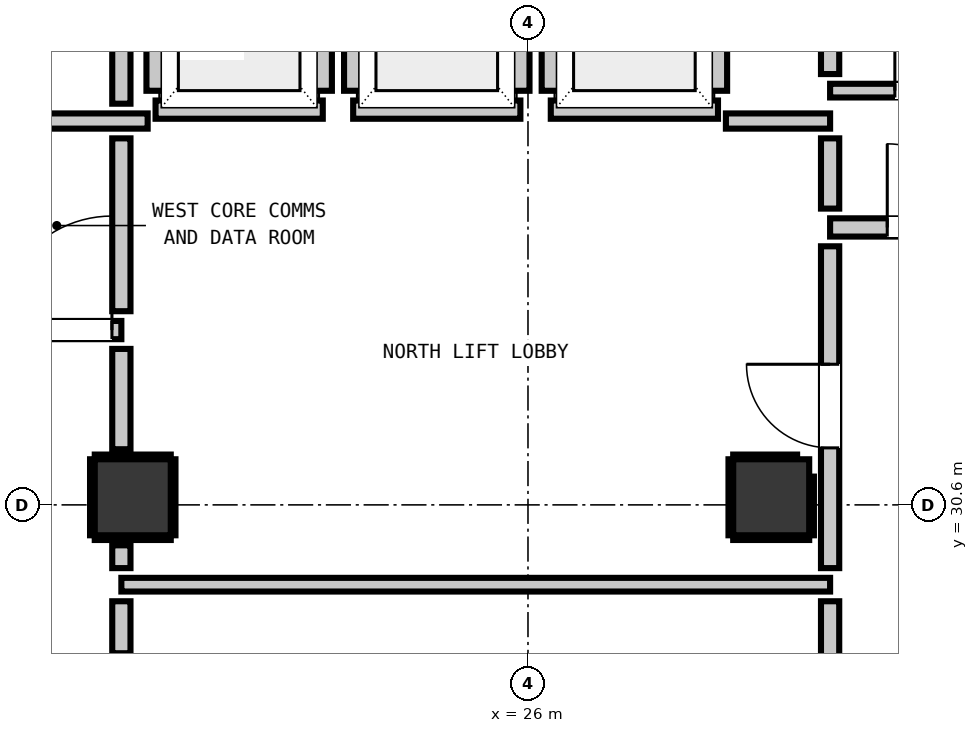
"""IFC4 building model, lengths in metres.
Left out: names, types, materials, properties, quantities, classifications, styles, units other than length and angle.
Written with IfcOpenShell. Run it as: python <this file> out.ifc"""

import sys

from ifc_helpers import new_model, si_unit, direction, frame, frame_2d, origin, origin_2d, place, context, subcontext, project, spatial, rectangle, extrude, element, fill, save


model = new_model("IFC4")
c1 = context("Model", 3, precision=1e-05, world=origin(), true_north=direction((0.0, 1.0)))
c2 = subcontext(c1, "Body", "Model", "MODEL_VIEW")
j1 = project(units=[si_unit("LENGTHUNIT", "METRE"), si_unit("PLANEANGLEUNIT", "RADIAN")], contexts=[c1])
p1 = place(None, origin())
s1 = spatial("IfcSite", under=j1, at=p1, CompositionType="ELEMENT")
p2 = place(p1, origin())
s2 = spatial("IfcBuilding", under=s1, at=p2, CompositionType="ELEMENT")
p3 = place(p2, frame((0.0, 0.0, 61.84)))
s3 = spatial("IfcBuildingStorey", under=s2, at=p3, CompositionType="ELEMENT", Elevation=61.84)
for number, where, z_axis, x_axis in (
    (1, (20.8, 30.7, 0.0), (0.0, 0.0, 1.0), (1.0, 0.0, 0.0)),
    (2, (29.2, 30.7, 0.0), (0.0, 0.0, 1.0), (1.0, 0.0, 0.0)),
):
    element("IfcColumn", number, at=place(p3, frame(where, z_axis=z_axis, x_axis=x_axis)), inside=s3, PredefinedType="COLUMN", context=c2, shape_type="SweptSolid", body=[
        extrude(rectangle(XDim=1.0, YDim=1.0, at=origin_2d()), origin(), (0.0, 0.0, 1.0), 3.32),
    ])
p4 = place(p3, frame((21.1, 35.8, 0.0), z_axis=(0.0, 0.0, 1.0), x_axis=(1.0, 0.0, 0.0)))
e3 = element("IfcWall", 3, at=p4, inside=s3, PredefinedType="PARTITIONING", context=c2, shape_type="SweptSolid", body=[
    extrude(rectangle(XDim=2.2, YDim=0.24, at=frame_2d((1.1, 0.0))), origin(), (0.0, 0.0, 1.0), 3.06),
])
p5 = place(p3, frame((21.1, 36.048, 0.0), z_axis=(0.0, 0.0, 1.0), x_axis=(0.0, 1.0, 0.0)))
e4 = element("IfcWall", 4, at=p5, inside=s3, PredefinedType="PARTITIONING", context=c2, shape_type="SweptSolid", body=[
    extrude(rectangle(XDim=2.104, YDim=0.24, at=frame_2d((1.052, 0.0))), origin(), (0.0, 0.0, 1.0), 2.295),
])
p6 = place(p3, frame((23.3, 36.048, 0.0), z_axis=(0.0, 0.0, 1.0), x_axis=(0.0, 1.0, 0.0)))
e5 = element("IfcWall", 5, at=p6, inside=s3, PredefinedType="PARTITIONING", context=c2, shape_type="SweptSolid", body=[
    extrude(rectangle(XDim=2.104, YDim=0.24, at=frame_2d((1.052, 0.0))), origin(), (0.0, 0.0, 1.0), 3.06),
])
p7 = place(p3, frame((23.7, 35.8, 0.0), z_axis=(0.0, 0.0, 1.0), x_axis=(1.0, 0.0, 0.0)))
e6 = element("IfcWall", 6, at=p7, inside=s3, PredefinedType="PARTITIONING", context=c2, shape_type="SweptSolid", body=[
    extrude(rectangle(XDim=2.2, YDim=0.24, at=frame_2d((1.1, 0.0))), origin(), (0.0, 0.0, 1.0), 3.06),
])
for number, where, z_axis, x_axis in (
    (7, (23.7, 36.048, 0.0), (0.0, 0.0, 1.0), (0.0, 1.0, 0.0)),
    (8, (25.9, 36.048, 0.0), (0.0, 0.0, 1.0), (0.0, 1.0, 0.0)),
):
    element("IfcWall", number, at=place(p3, frame(where, z_axis=z_axis, x_axis=x_axis)), inside=s3, PredefinedType="PARTITIONING", context=c2, shape_type="SweptSolid", body=[
        extrude(rectangle(XDim=2.104, YDim=0.24, at=frame_2d((1.052, 0.0))), origin(), (0.0, 0.0, 1.0), 3.06),
    ])
p8 = place(p3, frame((26.3, 35.8, 0.0), z_axis=(0.0, 0.0, 1.0), x_axis=(1.0, 0.0, 0.0)))
e9 = element("IfcWall", 9, at=p8, inside=s3, PredefinedType="PARTITIONING", context=c2, shape_type="SweptSolid", body=[
    extrude(rectangle(XDim=2.2, YDim=0.24, at=frame_2d((1.1, 0.0))), origin(), (0.0, 0.0, 1.0), 3.06),
])
for number, where, z_axis, x_axis in (
    (10, (26.3, 36.048, 0.0), (0.0, 0.0, 1.0), (0.0, 1.0, 0.0)),
    (11, (28.5, 36.048, 0.0), (0.0, 0.0, 1.0), (0.0, 1.0, 0.0)),
):
    element("IfcWall", number, at=place(p3, frame(where, z_axis=z_axis, x_axis=x_axis)), inside=s3, PredefinedType="PARTITIONING", context=c2, shape_type="SweptSolid", body=[
        extrude(rectangle(XDim=2.104, YDim=0.24, at=frame_2d((1.052, 0.0))), origin(), (0.0, 0.0, 1.0), 3.06),
    ])
p9 = place(p3, frame((17.45, 32.9, 0.0), z_axis=(0.0, 0.0, 1.0), x_axis=(1.0, 0.0, 0.0)))
e12 = element("IfcWall", 12, at=p9, inside=s3, PredefinedType="PARTITIONING", context=c2, shape_type="SweptSolid", body=[
    extrude(rectangle(XDim=3.2, YDim=0.24, at=frame_2d((1.6, 0.0))), origin(), (0.0, 0.0, 1.0), 3.06),
])
p10 = place(p9, frame((0.159, 0.0, 0.0)))
e13 = element("IfcOpeningElement", 13, at=p10, cuts=e12, PredefinedType="OPENING", context=c2, shape_type="SweptSolid", body=[
    extrude(rectangle(XDim=1.1, YDim=2.15, at=frame_2d((0.55, 1.075))), frame((0.0, 0.13, 0.0), z_axis=(0.0, -1.0, 0.0), x_axis=(1.0, 0.0, 0.0)), (0.0, 0.0, 1.0), 0.26),
])
p11 = place(p9, frame((1.576, 0.0, 0.0)))
e14 = element("IfcOpeningElement", 14, at=p11, cuts=e12, PredefinedType="OPENING", context=c2, shape_type="SweptSolid", body=[
    extrude(rectangle(XDim=1.5, YDim=2.15, at=frame_2d((0.75, 1.075))), frame((0.0, 0.13, 0.0), z_axis=(0.0, -1.0, 0.0), x_axis=(1.0, 0.0, 0.0)), (0.0, 0.0, 1.0), 0.26),
])
p12 = place(p3, frame((29.975, 34.25, 0.0), z_axis=(0.0, 0.0, 1.0), x_axis=(1.0, 0.0, 0.0)))
e15 = element("IfcWall", 15, at=p12, inside=s3, PredefinedType="PARTITIONING", context=c2, shape_type="SweptSolid", body=[
    extrude(rectangle(XDim=2.475, YDim=0.24, at=frame_2d((1.237, 0.0))), origin(), (0.0, 0.0, 1.0), 3.06),
])
p13 = place(p12, frame((0.752, 0.0, 0.0)))
e16 = element("IfcOpeningElement", 16, at=p13, cuts=e15, PredefinedType="OPENING", context=c2, shape_type="SweptSolid", body=[
    extrude(rectangle(XDim=1.1, YDim=2.15, at=frame_2d((0.55, 1.075))), frame((0.0, 0.13, 0.0), z_axis=(0.0, -1.0, 0.0), x_axis=(1.0, 0.0, 0.0)), (0.0, 0.0, 1.0), 0.26),
])
p14 = place(p3, frame((18.95, 35.65, 0.0), z_axis=(0.0, 0.0, 1.0), x_axis=(1.0, 0.0, 0.0)))
e17 = element("IfcWall", 17, at=p14, inside=s3, PredefinedType="PARTITIONING", context=c2, shape_type="SweptSolid", body=[
    extrude(rectangle(XDim=2.046, YDim=0.2, at=frame_2d((1.023, 0.0))), origin(), (0.0, 0.0, 1.0), 3.06),
])
p15 = place(p3, frame((28.604, 35.65, 0.0), z_axis=(0.0, 0.0, 1.0), x_axis=(1.0, 0.0, 0.0)))
e18 = element("IfcWall", 18, at=p15, inside=s3, PredefinedType="PARTITIONING", context=c2, shape_type="SweptSolid", body=[
    extrude(rectangle(XDim=1.371, YDim=0.2, at=frame_2d((0.686, 0.0))), origin(), (0.0, 0.0, 1.0), 3.06),
])
p16 = place(p3, frame((20.65, 29.55, 0.0), z_axis=(0.0, 0.0, 1.0), x_axis=(1.0, 0.0, 0.0)))
e19 = element("IfcWall", 19, at=p16, inside=s3, PredefinedType="PARTITIONING", context=c2, shape_type="SweptSolid", body=[
    extrude(rectangle(XDim=9.325, YDim=0.18, at=frame_2d((4.663, 0.0))), origin(), (0.0, 0.0, 1.0), 3.06),
])
p17 = place(p3, frame((29.975, 36.05, 0.0), z_axis=(0.0, 0.0, 1.0), x_axis=(1.0, 0.0, 0.0)))
e20 = element("IfcWall", 20, at=p17, inside=s3, PredefinedType="PARTITIONING", context=c2, shape_type="SweptSolid", body=[
    extrude(rectangle(XDim=2.505, YDim=0.18, at=frame_2d((1.252, 0.0))), origin(), (0.0, 0.0, 1.0), 3.06),
])
p18 = place(p17, frame((0.852, 0.0, 0.0)))
e21 = element("IfcOpeningElement", 21, at=p18, cuts=e20, PredefinedType="OPENING", context=c2, shape_type="SweptSolid", body=[
    extrude(rectangle(XDim=0.9, YDim=2.1, at=frame_2d((0.45, 1.05))), frame((0.0, 0.1, 0.0), z_axis=(0.0, -1.0, 0.0), x_axis=(1.0, 0.0, 0.0)), (0.0, 0.0, 1.0), 0.2),
])
p19 = place(p3, frame((20.65, 28.648, 0.0), z_axis=(0.0, 0.0, 1.0), x_axis=(0.0, 1.0, 0.0)))
e22 = element("IfcWall", 22, at=p19, inside=s3, PredefinedType="PARTITIONING", context=c2, shape_type="SweptSolid", body=[
    extrude(rectangle(XDim=0.684, YDim=0.24, at=frame_2d((0.342, 0.0))), origin(), (0.0, 0.0, 1.0), 2.295),
])
p20 = place(p3, frame((20.65, 29.768, 0.0), z_axis=(0.0, 0.0, 1.0), x_axis=(0.0, 1.0, 0.0)))
e23 = element("IfcWall", 23, at=p20, inside=s3, PredefinedType="PARTITIONING", context=c2, shape_type="SweptSolid", body=[
    extrude(rectangle(XDim=0.3, YDim=0.24, at=frame_2d((0.15, 0.0))), origin(), (0.0, 0.0, 1.0), 2.295),
])
p21 = place(p3, frame((20.65, 31.332, 0.0), z_axis=(0.0, 0.0, 1.0), x_axis=(0.0, 1.0, 0.0)))
e24 = element("IfcWall", 24, at=p21, inside=s3, PredefinedType="PARTITIONING", context=c2, shape_type="SweptSolid", body=[
    extrude(rectangle(XDim=1.32, YDim=0.24, at=frame_2d((0.66, 0.0))), origin(), (0.0, 0.0, 1.0), 2.295),
])
p22 = place(p3, frame((20.65, 33.148, 0.0), z_axis=(0.0, 0.0, 1.0), x_axis=(0.0, 1.0, 0.0)))
e25 = element("IfcWall", 25, at=p22, inside=s3, PredefinedType="PARTITIONING", context=c2, shape_type="SweptSolid", body=[
    extrude(rectangle(XDim=2.274, YDim=0.24, at=frame_2d((1.137, 0.0))), origin(), (0.0, 0.0, 1.0), 2.295),
])
p23 = place(p3, frame((20.65, 35.878, 0.0), z_axis=(0.0, 0.0, 1.0), x_axis=(0.0, 1.0, 0.0)))
e26 = element("IfcWall", 26, at=p23, inside=s3, PredefinedType="PARTITIONING", context=c2, shape_type="SweptSolid", body=[
    extrude(rectangle(XDim=2.674, YDim=0.24, at=frame_2d((1.337, 0.0))), origin(), (0.0, 0.0, 1.0), 2.295),
])
p24 = place(p3, frame((29.975, 25.648, 0.0), z_axis=(0.0, 0.0, 1.0), x_axis=(0.0, 1.0, 0.0)))
e27 = element("IfcWall", 27, at=p24, inside=s3, PredefinedType="PARTITIONING", context=c2, shape_type="SweptSolid", body=[
    extrude(rectangle(XDim=3.684, YDim=0.24, at=frame_2d((1.842, 0.0))), origin(), (0.0, 0.0, 1.0), 3.06),
])
p25 = place(p3, frame((29.975, 29.768, 0.0), z_axis=(0.0, 0.0, 1.0), x_axis=(0.0, 1.0, 0.0)))
e28 = element("IfcWall", 28, at=p25, inside=s3, PredefinedType="PARTITIONING", context=c2, shape_type="SweptSolid", body=[
    extrude(rectangle(XDim=4.234, YDim=0.24, at=frame_2d((2.117, 0.0))), origin(), (0.0, 0.0, 1.0), 3.06),
])
p26 = place(p25, frame((1.582, 0.0, 0.0)))
e29 = element("IfcOpeningElement", 29, at=p26, cuts=e28, PredefinedType="OPENING", context=c2, shape_type="SweptSolid", body=[
    extrude(rectangle(XDim=1.1, YDim=2.15, at=frame_2d((0.55, 1.075))), frame((0.0, 0.13, 0.0), z_axis=(0.0, -1.0, 0.0), x_axis=(1.0, 0.0, 0.0)), (0.0, 0.0, 1.0), 0.26),
])
p27 = place(p3, frame((29.975, 34.498, 0.0), z_axis=(0.0, 0.0, 1.0), x_axis=(0.0, 1.0, 0.0)))
e30 = element("IfcWall", 30, at=p27, inside=s3, PredefinedType="PARTITIONING", context=c2, shape_type="SweptSolid", body=[
    extrude(rectangle(XDim=0.924, YDim=0.24, at=frame_2d((0.462, 0.0))), origin(), (0.0, 0.0, 1.0), 3.06),
])
p28 = place(p3, frame((29.975, 36.268, 0.0), z_axis=(0.0, 0.0, 1.0), x_axis=(0.0, 1.0, 0.0)))
e31 = element("IfcWall", 31, at=p28, inside=s3, PredefinedType="PARTITIONING", context=c2, shape_type="SweptSolid", body=[
    extrude(rectangle(XDim=2.284, YDim=0.24, at=frame_2d((1.142, 0.0))), origin(), (0.0, 0.0, 1.0), 3.06),
])
for number, where, z_axis, x_axis in (
    (32, (20.3, 30.168, 0.0), (0.0, 0.0, 1.0), (1.0, 0.0, 0.0)),
    (33, (20.3, 31.232, 0.0), (0.0, 0.0, 1.0), (1.0, 0.0, 0.0)),
    (34, (20.268, 30.2, 0.0), (0.0, 0.0, 1.0), (0.0, 1.0, 0.0)),
    (35, (21.332, 30.2, 0.0), (0.0, 0.0, 1.0), (0.0, 1.0, 0.0)),
    (36, (28.7, 30.168, 0.0), (0.0, 0.0, 1.0), (1.0, 0.0, 0.0)),
):
    element("IfcWall", number, at=place(p3, frame(where, z_axis=z_axis, x_axis=x_axis)), inside=s3, PredefinedType="PARTITIONING", context=c2, shape_type="SweptSolid", body=[
        extrude(rectangle(XDim=1.0, YDim=0.06, at=frame_2d((0.5, 0.0))), origin(), (0.0, 0.0, 1.0), 1.45),
    ])
p29 = place(p3, frame((28.7, 31.232, 0.0), z_axis=(0.0, 0.0, 1.0), x_axis=(1.0, 0.0, 0.0)))
e37 = element("IfcWall", 37, at=p29, inside=s3, PredefinedType="PARTITIONING", context=c2, shape_type="SweptSolid", body=[
    extrude(rectangle(XDim=0.841, YDim=0.06, at=frame_2d((0.42, 0.0))), origin(), (0.0, 0.0, 1.0), 1.45),
])
p30 = place(p3, frame((28.668, 30.2, 0.0), z_axis=(0.0, 0.0, 1.0), x_axis=(0.0, 1.0, 0.0)))
e38 = element("IfcWall", 38, at=p30, inside=s3, PredefinedType="PARTITIONING", context=c2, shape_type="SweptSolid", body=[
    extrude(rectangle(XDim=1.0, YDim=0.06, at=frame_2d((0.5, 0.0))), origin(), (0.0, 0.0, 1.0), 1.45),
])
p31 = place(p3, frame((29.732, 30.2, 0.0), z_axis=(0.0, 0.0, 1.0), x_axis=(0.0, 1.0, 0.0)))
e39 = element("IfcWall", 39, at=p31, inside=s3, PredefinedType="PARTITIONING", context=c2, shape_type="SweptSolid", body=[
    extrude(rectangle(XDim=0.772, YDim=0.06, at=frame_2d((0.386, 0.0))), origin(), (0.0, 0.0, 1.0), 1.45),
])
p32 = place(p26, origin())
e40 = element("IfcDoor", 40, at=p32, inside=s3, OperationType="SINGLE_SWING_RIGHT", PredefinedType="DOOR", context=c2, shape_type="SweptSolid", body=[
    extrude(rectangle(XDim=1.1, YDim=2.15, at=frame_2d((0.55, 1.075))), frame((0.0, 0.025, 0.0), z_axis=(0.0, -1.0, 0.0), x_axis=(1.0, 0.0, 0.0)), (0.0, 0.0, 1.0), 0.05),
])
fill(e29, e40)
p33 = place(p13, origin())
e41 = element("IfcDoor", 41, at=p33, inside=s3, OperationType="SINGLE_SWING_LEFT", PredefinedType="DOOR", context=c2, shape_type="SweptSolid", body=[
    extrude(rectangle(XDim=1.1, YDim=2.15, at=frame_2d((0.55, 1.075))), frame((0.0, 0.025, 0.0), z_axis=(0.0, -1.0, 0.0), x_axis=(1.0, 0.0, 0.0)), (0.0, 0.0, 1.0), 0.05),
])
fill(e16, e41)
p34 = place(p11, origin())
e42 = element("IfcDoor", 42, at=p34, inside=s3, OperationType="SINGLE_SWING_RIGHT", PredefinedType="DOOR", context=c2, shape_type="SweptSolid", body=[
    extrude(rectangle(XDim=1.5, YDim=2.15, at=frame_2d((0.75, 1.075))), frame((0.0, 0.025, 0.0), z_axis=(0.0, -1.0, 0.0), x_axis=(1.0, 0.0, 0.0)), (0.0, 0.0, 1.0), 0.05),
])
fill(e14, e42)
p35 = place(p18, origin())
e43 = element("IfcDoor", 43, at=p35, inside=s3, OperationType="SINGLE_SWING_LEFT", PredefinedType="DOOR", context=c2, shape_type="SweptSolid", body=[
    extrude(rectangle(XDim=0.9, YDim=2.1, at=frame_2d((0.45, 1.05))), frame((0.0, 0.025, 0.0), z_axis=(0.0, -1.0, 0.0), x_axis=(1.0, 0.0, 0.0)), (0.0, 0.0, 1.0), 0.05),
])
fill(e21, e43)
save(model, sys.argv[1])
